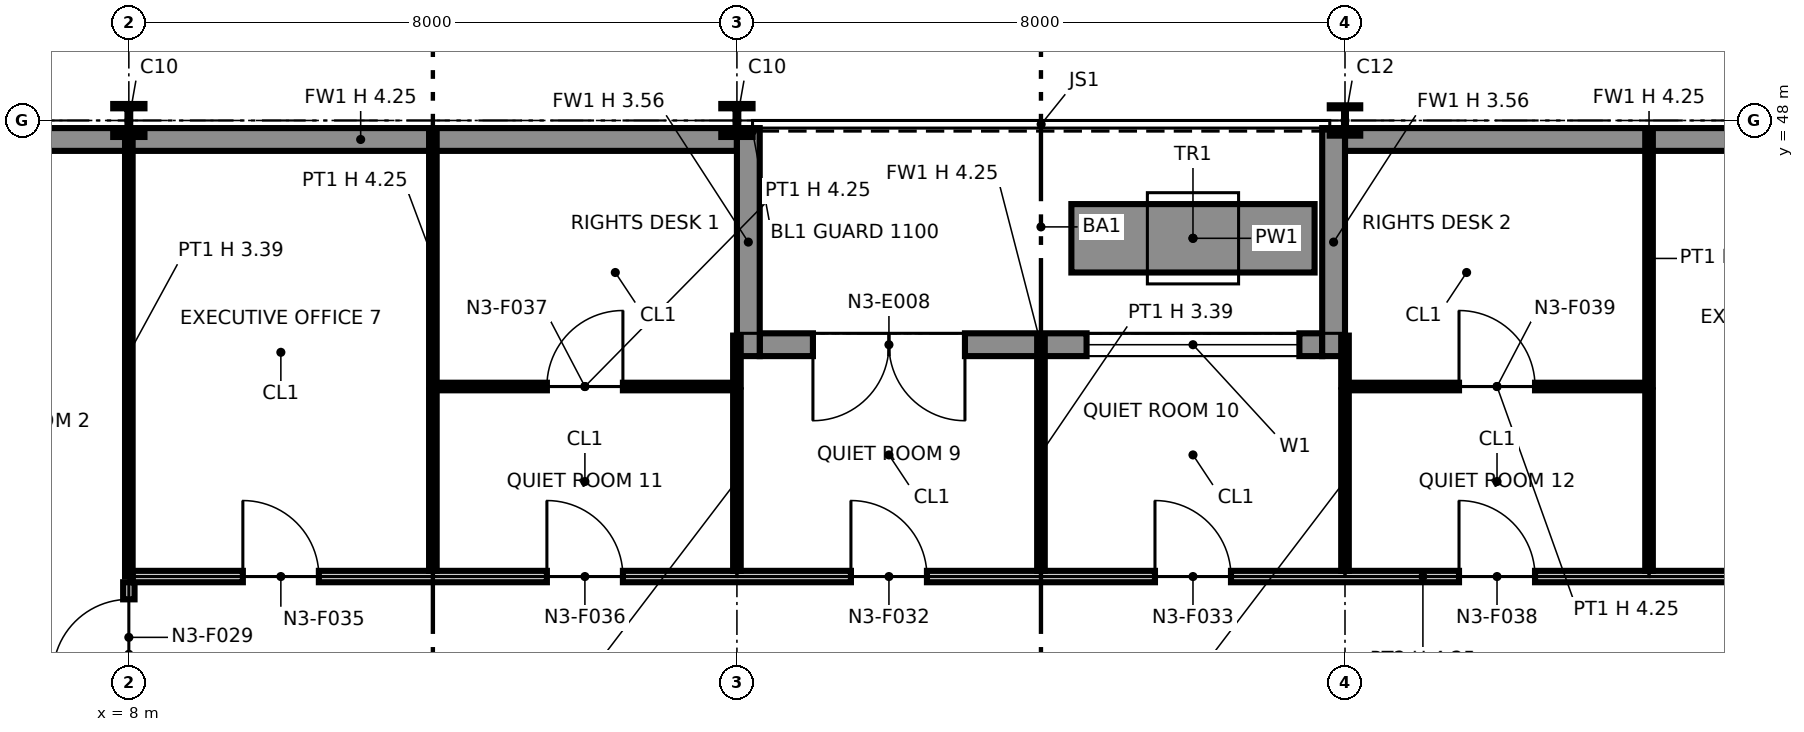
"""IFC4 building model, lengths in metres.
Left out: names, types, materials, properties, quantities, classifications, styles, units other than length and angle.
Written with IfcOpenShell. Run it as: python <this file> out.ifc"""

import sys

from ifc_helpers import new_model, si_unit, direction, frame, frame_2d, origin, origin_2d, place, context, subcontext, project, spatial, rectangle, i_section, extrude, element, fill, save


model = new_model("IFC4")
c1 = context("Model", 3, precision=1e-05, world=origin(), true_north=direction((0.0, 1.0)))
c2 = subcontext(c1, "Body", "Model", "MODEL_VIEW")
j1 = project(units=[si_unit("LENGTHUNIT", "METRE"), si_unit("PLANEANGLEUNIT", "RADIAN")], contexts=[c1])
p1 = place(None, origin())
s1 = spatial("IfcSite", under=j1, at=p1, CompositionType="ELEMENT")
p2 = place(p1, origin())
s2 = spatial("IfcBuilding", under=s1, at=p2, CompositionType="ELEMENT")
p3 = place(p2, frame((0.0, 0.0, 61.2)))
s3 = spatial("IfcBuildingStorey", under=s2, at=p3, CompositionType="ELEMENT", Elevation=61.2)
for number, where, z_axis, x_axis in (
    (1, (8.0, 48.0, 0.0), (0.0, 0.0, 1.0), (1.0, 0.0, 0.0)),
    (2, (16.0, 48.0, 0.0), (0.0, 0.0, 1.0), (1.0, 0.0, 0.0)),
):
    element("IfcColumn", number, at=place(p3, frame(where, z_axis=z_axis, x_axis=x_axis)), inside=s3, PredefinedType="COLUMN", context=c2, shape_type="SweptSolid", body=[
        extrude(i_section(OverallWidth=0.411, OverallDepth=0.434, WebThickness=0.036, FlangeThickness=0.057, at=origin_2d()), origin(), (0.0, 0.0, 1.0), 4.25),
    ])
p4 = place(p3, frame((24.0, 48.0, 0.0), z_axis=(0.0, 0.0, 1.0), x_axis=(1.0, 0.0, 0.0)))
e3 = element("IfcColumn", 3, at=p4, inside=s3, PredefinedType="COLUMN", context=c2, shape_type="SweptSolid", body=[
    extrude(i_section(OverallWidth=0.401, OverallDepth=0.399, WebThickness=0.025, FlangeThickness=0.04, at=origin_2d()), origin(), (0.0, 0.0, 1.0), 4.25),
])
p5 = place(p3, frame((32.0, 47.75, 0.0), z_axis=(0.0, 0.0, 1.0), x_axis=(-1.0, 0.0, 0.0)))
e4 = element("IfcWall", 4, at=p5, inside=s3, PredefinedType="SOLIDWALL", context=c2, shape_type="SweptSolid", body=[
    extrude(rectangle(XDim=8.0, YDim=0.3, at=frame_2d((4.0, 0.0))), origin(), (0.0, 0.0, 1.0), 4.25),
])
p6 = place(p3, frame((23.7, 45.05, 0.0), z_axis=(0.0, 0.0, 1.0), x_axis=(-1.0, 0.0, 0.0)))
e5 = element("IfcWall", 5, at=p6, inside=s3, PredefinedType="SOLIDWALL", context=c2, shape_type="SweptSolid", body=[
    extrude(rectangle(XDim=7.4, YDim=0.3, at=frame_2d((3.7, 0.0))), origin(), (0.0, 0.0, 1.0), 4.25),
])
p7 = place(p6, frame((0.3, 0.0, 0.9)))
e6 = element("IfcOpeningElement", 6, at=p7, cuts=e5, PredefinedType="OPENING", context=c2, shape_type="SweptSolid", body=[
    extrude(rectangle(XDim=2.8, YDim=2.2, at=frame_2d((1.4, 1.1))), frame((0.0, 0.16, 0.0), z_axis=(0.0, -1.0, 0.0), x_axis=(1.0, 0.0, 0.0)), (0.0, 0.0, 1.0), 0.32),
])
p8 = place(p6, frame((4.7, 0.0, 0.0)))
e7 = element("IfcOpeningElement", 7, at=p8, cuts=e5, PredefinedType="OPENING", context=c2, shape_type="SweptSolid", body=[
    extrude(rectangle(XDim=2.0, YDim=2.4, at=frame_2d((1.0, 1.2))), frame((0.0, 0.16, 0.0), z_axis=(0.0, -1.0, 0.0), x_axis=(1.0, 0.0, 0.0)), (0.0, 0.0, 1.0), 0.32),
])
for number, where, z_axis, x_axis in (
    (8, (23.85, 47.9, 0.0), (0.0, 0.0, 1.0), (0.0, -1.0, 0.0)),
    (9, (16.15, 47.9, 0.0), (0.0, 0.0, 1.0), (0.0, -1.0, 0.0)),
):
    element("IfcWall", number, at=place(p3, frame(where, z_axis=z_axis, x_axis=x_axis)), inside=s3, PredefinedType="SOLIDWALL", context=c2, shape_type="SweptSolid", body=[
        extrude(rectangle(XDim=3.0, YDim=0.3, at=frame_2d((1.5, 0.0))), origin(), (0.0, 0.0, 1.0), 3.556),
    ])
p9 = place(p3, frame((16.0, 47.75, 0.0), z_axis=(0.0, 0.0, 1.0), x_axis=(-1.0, 0.0, 0.0)))
e10 = element("IfcWall", 10, at=p9, inside=s3, PredefinedType="SOLIDWALL", context=c2, shape_type="SweptSolid", body=[
    extrude(rectangle(XDim=9.9, YDim=0.3, at=frame_2d((4.95, 0.0))), origin(), (0.0, 0.0, 1.0), 4.25),
])
p10 = place(p3, frame((23.6, 46.45, 0.0), z_axis=(0.0, 0.0, 1.0), x_axis=(-1.0, 0.0, 0.0)))
e11 = element("IfcWall", 11, at=p10, inside=s3, PredefinedType="SOLIDWALL", context=c2, shape_type="SweptSolid", body=[
    extrude(rectangle(XDim=3.2, YDim=0.9, at=frame_2d((1.6, 0.0))), origin(), (0.0, 0.0, 1.0), 0.6),
])
p11 = place(p3, frame((8.0, 40.03, 0.0), z_axis=(0.0, 0.0, 1.0), x_axis=(0.0, 1.0, 0.0)))
e12 = element("IfcWall", 12, at=p11, inside=s3, PredefinedType="PARTITIONING", context=c2, shape_type="SweptSolid", body=[
    extrude(rectangle(XDim=1.895, YDim=0.15, at=frame_2d((0.948, 0.0))), origin(), (0.0, 0.0, 1.0), 3.391),
])
p12 = place(p11, frame((0.67, 0.0, 0.0)))
e13 = element("IfcOpeningElement", 13, at=p12, cuts=e12, PredefinedType="OPENING", context=c2, shape_type="SweptSolid", body=[
    extrude(rectangle(XDim=1.0, YDim=2.1, at=frame_2d((0.5, 1.05))), frame((0.0, 0.085, 0.0), z_axis=(0.0, -1.0, 0.0), x_axis=(1.0, 0.0, 0.0)), (0.0, 0.0, 1.0), 0.17),
])
p13 = place(p3, frame((8.05, 42.0, 0.0), z_axis=(0.0, 0.0, 1.0), x_axis=(1.0, 0.0, 0.0)))
e14 = element("IfcWall", 14, at=p13, inside=s3, PredefinedType="PARTITIONING", context=c2, shape_type="SweptSolid", body=[
    extrude(rectangle(XDim=33.95, YDim=0.15, at=frame_2d((16.975, 0.0))), origin(), (0.0, 0.0, 1.0), 4.25),
])
p14 = place(p13, frame((9.45, 0.0, 0.0)))
e15 = element("IfcOpeningElement", 15, at=p14, cuts=e14, PredefinedType="OPENING", context=c2, shape_type="SweptSolid", body=[
    extrude(rectangle(XDim=1.0, YDim=2.1, at=frame_2d((0.5, 1.05))), frame((0.0, 0.085, 0.0), z_axis=(0.0, -1.0, 0.0), x_axis=(1.0, 0.0, 0.0)), (0.0, 0.0, 1.0), 0.17),
])
p15 = place(p13, frame((13.45, 0.0, 0.0)))
e16 = element("IfcOpeningElement", 16, at=p15, cuts=e14, PredefinedType="OPENING", context=c2, shape_type="SweptSolid", body=[
    extrude(rectangle(XDim=1.0, YDim=2.1, at=frame_2d((0.5, 1.05))), frame((0.0, 0.085, 0.0), z_axis=(0.0, -1.0, 0.0), x_axis=(1.0, 0.0, 0.0)), (0.0, 0.0, 1.0), 0.17),
])
p16 = place(p13, frame((27.45, 0.0, 0.0)))
e17 = element("IfcOpeningElement", 17, at=p16, cuts=e14, PredefinedType="OPENING", context=c2, shape_type="SweptSolid", body=[
    extrude(rectangle(XDim=1.0, YDim=2.1, at=frame_2d((0.5, 1.05))), frame((0.0, 0.085, 0.0), z_axis=(0.0, -1.0, 0.0), x_axis=(1.0, 0.0, 0.0)), (0.0, 0.0, 1.0), 0.17),
])
p17 = place(p13, frame((1.45, 0.0, 0.0)))
e18 = element("IfcOpeningElement", 18, at=p17, cuts=e14, PredefinedType="OPENING", context=c2, shape_type="SweptSolid", body=[
    extrude(rectangle(XDim=1.0, YDim=2.1, at=frame_2d((0.5, 1.05))), frame((0.0, 0.085, 0.0), z_axis=(0.0, -1.0, 0.0), x_axis=(1.0, 0.0, 0.0)), (0.0, 0.0, 1.0), 0.17),
])
p18 = place(p13, frame((5.45, 0.0, 0.0)))
e19 = element("IfcOpeningElement", 19, at=p18, cuts=e14, PredefinedType="OPENING", context=c2, shape_type="SweptSolid", body=[
    extrude(rectangle(XDim=1.0, YDim=2.1, at=frame_2d((0.5, 1.05))), frame((0.0, 0.085, 0.0), z_axis=(0.0, -1.0, 0.0), x_axis=(1.0, 0.0, 0.0)), (0.0, 0.0, 1.0), 0.17),
])
p19 = place(p13, frame((17.45, 0.0, 0.0)))
e20 = element("IfcOpeningElement", 20, at=p19, cuts=e14, PredefinedType="OPENING", context=c2, shape_type="SweptSolid", body=[
    extrude(rectangle(XDim=1.0, YDim=2.1, at=frame_2d((0.5, 1.05))), frame((0.0, 0.085, 0.0), z_axis=(0.0, -1.0, 0.0), x_axis=(1.0, 0.0, 0.0)), (0.0, 0.0, 1.0), 0.17),
])
p20 = place(p13, frame((21.45, 0.0, 0.0)))
e21 = element("IfcOpeningElement", 21, at=p20, cuts=e14, PredefinedType="OPENING", context=c2, shape_type="SweptSolid", body=[
    extrude(rectangle(XDim=1.0, YDim=2.1, at=frame_2d((0.5, 1.05))), frame((0.0, 0.085, 0.0), z_axis=(0.0, -1.0, 0.0), x_axis=(1.0, 0.0, 0.0)), (0.0, 0.0, 1.0), 0.17),
])
p21 = place(p3, frame((8.0, 42.0, 0.0), z_axis=(0.0, 0.0, 1.0), x_axis=(0.0, 1.0, 0.0)))
e22 = element("IfcWall", 22, at=p21, inside=s3, PredefinedType="PARTITIONING", context=c2, shape_type="SweptSolid", body=[
    extrude(rectangle(XDim=5.87, YDim=0.1, at=frame_2d((2.935, 0.0))), origin(), (0.0, 0.0, 1.0), 3.391),
])
for number, where, z_axis, x_axis in (
    (23, (12.0, 42.075, 0.0), (0.0, 0.0, 1.0), (0.0, 1.0, 0.0)),
    (24, (16.0, 42.075, 0.0), (0.0, 0.0, 1.0), (0.0, 1.0, 0.0)),
):
    element("IfcWall", number, at=place(p3, frame(where, z_axis=z_axis, x_axis=x_axis)), inside=s3, PredefinedType="PARTITIONING", context=c2, shape_type="SweptSolid", body=[
        extrude(rectangle(XDim=2.375, YDim=0.1, at=frame_2d((1.188, 0.0))), origin(), (0.0, 0.0, 1.0), 3.391),
    ])
p22 = place(p3, frame((20.0, 42.075, 0.0), z_axis=(0.0, 0.0, 1.0), x_axis=(0.0, 1.0, 0.0)))
e25 = element("IfcWall", 25, at=p22, inside=s3, PredefinedType="PARTITIONING", context=c2, shape_type="SweptSolid", body=[
    extrude(rectangle(XDim=3.095, YDim=0.1, at=frame_2d((1.547, 0.0))), origin(), (0.0, 0.0, 1.0), 3.391),
])
for number, where, z_axis, x_axis in (
    (26, (24.0, 42.075, 0.0), (0.0, 0.0, 1.0), (0.0, 1.0, 0.0)),
    (27, (28.0, 42.075, 0.0), (0.0, 0.0, 1.0), (0.0, 1.0, 0.0)),
):
    element("IfcWall", number, at=place(p3, frame(where, z_axis=z_axis, x_axis=x_axis)), inside=s3, PredefinedType="PARTITIONING", context=c2, shape_type="SweptSolid", body=[
        extrude(rectangle(XDim=2.375, YDim=0.1, at=frame_2d((1.188, 0.0))), origin(), (0.0, 0.0, 1.0), 3.391),
    ])
p23 = place(p3, frame((12.05, 44.5, 0.0), z_axis=(0.0, 0.0, 1.0), x_axis=(1.0, 0.0, 0.0)))
e28 = element("IfcWall", 28, at=p23, inside=s3, PredefinedType="PARTITIONING", context=c2, shape_type="SweptSolid", body=[
    extrude(rectangle(XDim=3.9, YDim=0.1, at=frame_2d((1.95, 0.0))), origin(), (0.0, 0.0, 1.0), 4.25),
])
p24 = place(p23, frame((1.45, 0.0, 0.0)))
e29 = element("IfcOpeningElement", 29, at=p24, cuts=e28, PredefinedType="OPENING", context=c2, shape_type="SweptSolid", body=[
    extrude(rectangle(XDim=1.0, YDim=2.1, at=frame_2d((0.5, 1.05))), frame((0.0, 0.06, 0.0), z_axis=(0.0, -1.0, 0.0), x_axis=(1.0, 0.0, 0.0)), (0.0, 0.0, 1.0), 0.12),
])
p25 = place(p3, frame((12.0, 44.5, 0.0), z_axis=(0.0, 0.0, 1.0), x_axis=(0.0, 1.0, 0.0)))
e30 = element("IfcWall", 30, at=p25, inside=s3, PredefinedType="PARTITIONING", context=c2, shape_type="SweptSolid", body=[
    extrude(rectangle(XDim=3.37, YDim=0.1, at=frame_2d((1.685, 0.0))), origin(), (0.0, 0.0, 1.0), 4.25),
])
p26 = place(p3, frame((16.0, 44.5, 0.0), z_axis=(0.0, 0.0, 1.0), x_axis=(0.0, 1.0, 0.0)))
e31 = element("IfcWall", 31, at=p26, inside=s3, PredefinedType="PARTITIONING", context=c2, shape_type="SweptSolid", body=[
    extrude(rectangle(XDim=0.67, YDim=0.1, at=frame_2d((0.335, 0.0))), origin(), (0.0, 0.0, 1.0), 3.391),
])
p27 = place(p3, frame((24.05, 44.5, 0.0), z_axis=(0.0, 0.0, 1.0), x_axis=(1.0, 0.0, 0.0)))
e32 = element("IfcWall", 32, at=p27, inside=s3, PredefinedType="PARTITIONING", context=c2, shape_type="SweptSolid", body=[
    extrude(rectangle(XDim=3.9, YDim=0.1, at=frame_2d((1.95, 0.0))), origin(), (0.0, 0.0, 1.0), 4.25),
])
p28 = place(p27, frame((1.45, 0.0, 0.0)))
e33 = element("IfcOpeningElement", 33, at=p28, cuts=e32, PredefinedType="OPENING", context=c2, shape_type="SweptSolid", body=[
    extrude(rectangle(XDim=1.0, YDim=2.1, at=frame_2d((0.5, 1.05))), frame((0.0, 0.06, 0.0), z_axis=(0.0, -1.0, 0.0), x_axis=(1.0, 0.0, 0.0)), (0.0, 0.0, 1.0), 0.12),
])
p29 = place(p3, frame((24.0, 44.5, 0.0), z_axis=(0.0, 0.0, 1.0), x_axis=(0.0, 1.0, 0.0)))
e34 = element("IfcWall", 34, at=p29, inside=s3, PredefinedType="PARTITIONING", context=c2, shape_type="SweptSolid", body=[
    extrude(rectangle(XDim=0.67, YDim=0.1, at=frame_2d((0.335, 0.0))), origin(), (0.0, 0.0, 1.0), 3.391),
])
p30 = place(p3, frame((28.0, 44.5, 0.0), z_axis=(0.0, 0.0, 1.0), x_axis=(0.0, 1.0, 0.0)))
e35 = element("IfcWall", 35, at=p30, inside=s3, PredefinedType="PARTITIONING", context=c2, shape_type="SweptSolid", body=[
    extrude(rectangle(XDim=3.37, YDim=0.1, at=frame_2d((1.685, 0.0))), origin(), (0.0, 0.0, 1.0), 4.25),
])
p31 = place(p7, origin())
e36 = element("IfcWindow", 36, at=p31, inside=s3, PartitioningType="SINGLE_PANEL", PredefinedType="WINDOW", context=c2, shape_type="SweptSolid", body=[
    extrude(rectangle(XDim=2.8, YDim=2.2, at=frame_2d((1.4, 1.1))), frame((0.0, 0.03, 0.0), z_axis=(0.0, -1.0, 0.0), x_axis=(1.0, 0.0, 0.0)), (0.0, 0.0, 1.0), 0.06),
])
fill(e6, e36)
p32 = place(p8, origin())
e37 = element("IfcDoor", 37, at=p32, inside=s3, OperationType="DOUBLE_DOOR_SINGLE_SWING", PredefinedType="DOOR", context=c2, shape_type="SweptSolid", body=[
    extrude(rectangle(XDim=2.0, YDim=2.4, at=frame_2d((1.0, 1.2))), frame((0.0, 0.025, 0.0), z_axis=(0.0, -1.0, 0.0), x_axis=(1.0, 0.0, 0.0)), (0.0, 0.0, 1.0), 0.05),
])
fill(e7, e37)
p33 = place(p12, origin())
e38 = element("IfcDoor", 38, at=p33, inside=s3, OperationType="SINGLE_SWING_LEFT", PredefinedType="DOOR", context=c2, shape_type="SweptSolid", body=[
    extrude(rectangle(XDim=1.0, YDim=2.1, at=frame_2d((0.5, 1.05))), frame((0.0, 0.025, 0.0), z_axis=(0.0, -1.0, 0.0), x_axis=(1.0, 0.0, 0.0)), (0.0, 0.0, 1.0), 0.05),
])
fill(e13, e38)
p34 = place(p14, origin())
e39 = element("IfcDoor", 39, at=p34, inside=s3, OperationType="SINGLE_SWING_LEFT", PredefinedType="DOOR", context=c2, shape_type="SweptSolid", body=[
    extrude(rectangle(XDim=1.0, YDim=2.1, at=frame_2d((0.5, 1.05))), frame((0.0, 0.025, 0.0), z_axis=(0.0, -1.0, 0.0), x_axis=(1.0, 0.0, 0.0)), (0.0, 0.0, 1.0), 0.05),
])
fill(e15, e39)
p35 = place(p15, origin())
e40 = element("IfcDoor", 40, at=p35, inside=s3, OperationType="SINGLE_SWING_LEFT", PredefinedType="DOOR", context=c2, shape_type="SweptSolid", body=[
    extrude(rectangle(XDim=1.0, YDim=2.1, at=frame_2d((0.5, 1.05))), frame((0.0, 0.025, 0.0), z_axis=(0.0, -1.0, 0.0), x_axis=(1.0, 0.0, 0.0)), (0.0, 0.0, 1.0), 0.05),
])
fill(e16, e40)
p36 = place(p17, origin())
e41 = element("IfcDoor", 41, at=p36, inside=s3, OperationType="SINGLE_SWING_LEFT", PredefinedType="DOOR", context=c2, shape_type="SweptSolid", body=[
    extrude(rectangle(XDim=1.0, YDim=2.1, at=frame_2d((0.5, 1.05))), frame((0.0, 0.025, 0.0), z_axis=(0.0, -1.0, 0.0), x_axis=(1.0, 0.0, 0.0)), (0.0, 0.0, 1.0), 0.05),
])
fill(e18, e41)
p37 = place(p18, origin())
e42 = element("IfcDoor", 42, at=p37, inside=s3, OperationType="SINGLE_SWING_LEFT", PredefinedType="DOOR", context=c2, shape_type="SweptSolid", body=[
    extrude(rectangle(XDim=1.0, YDim=2.1, at=frame_2d((0.5, 1.05))), frame((0.0, 0.025, 0.0), z_axis=(0.0, -1.0, 0.0), x_axis=(1.0, 0.0, 0.0)), (0.0, 0.0, 1.0), 0.05),
])
fill(e19, e42)
p38 = place(p24, origin())
e43 = element("IfcDoor", 43, at=p38, inside=s3, OperationType="SINGLE_SWING_RIGHT", PredefinedType="DOOR", context=c2, shape_type="SweptSolid", body=[
    extrude(rectangle(XDim=1.0, YDim=2.1, at=frame_2d((0.5, 1.05))), frame((0.0, 0.025, 0.0), z_axis=(0.0, -1.0, 0.0), x_axis=(1.0, 0.0, 0.0)), (0.0, 0.0, 1.0), 0.05),
])
fill(e29, e43)
p39 = place(p19, origin())
e44 = element("IfcDoor", 44, at=p39, inside=s3, OperationType="SINGLE_SWING_LEFT", PredefinedType="DOOR", context=c2, shape_type="SweptSolid", body=[
    extrude(rectangle(XDim=1.0, YDim=2.1, at=frame_2d((0.5, 1.05))), frame((0.0, 0.025, 0.0), z_axis=(0.0, -1.0, 0.0), x_axis=(1.0, 0.0, 0.0)), (0.0, 0.0, 1.0), 0.05),
])
fill(e20, e44)
p40 = place(p28, origin())
e45 = element("IfcDoor", 45, at=p40, inside=s3, OperationType="SINGLE_SWING_LEFT", PredefinedType="DOOR", context=c2, shape_type="SweptSolid", body=[
    extrude(rectangle(XDim=1.0, YDim=2.1, at=frame_2d((0.5, 1.05))), frame((0.0, 0.025, 0.0), z_axis=(0.0, -1.0, 0.0), x_axis=(1.0, 0.0, 0.0)), (0.0, 0.0, 1.0), 0.05),
])
fill(e33, e45)
save(model, sys.argv[1])
